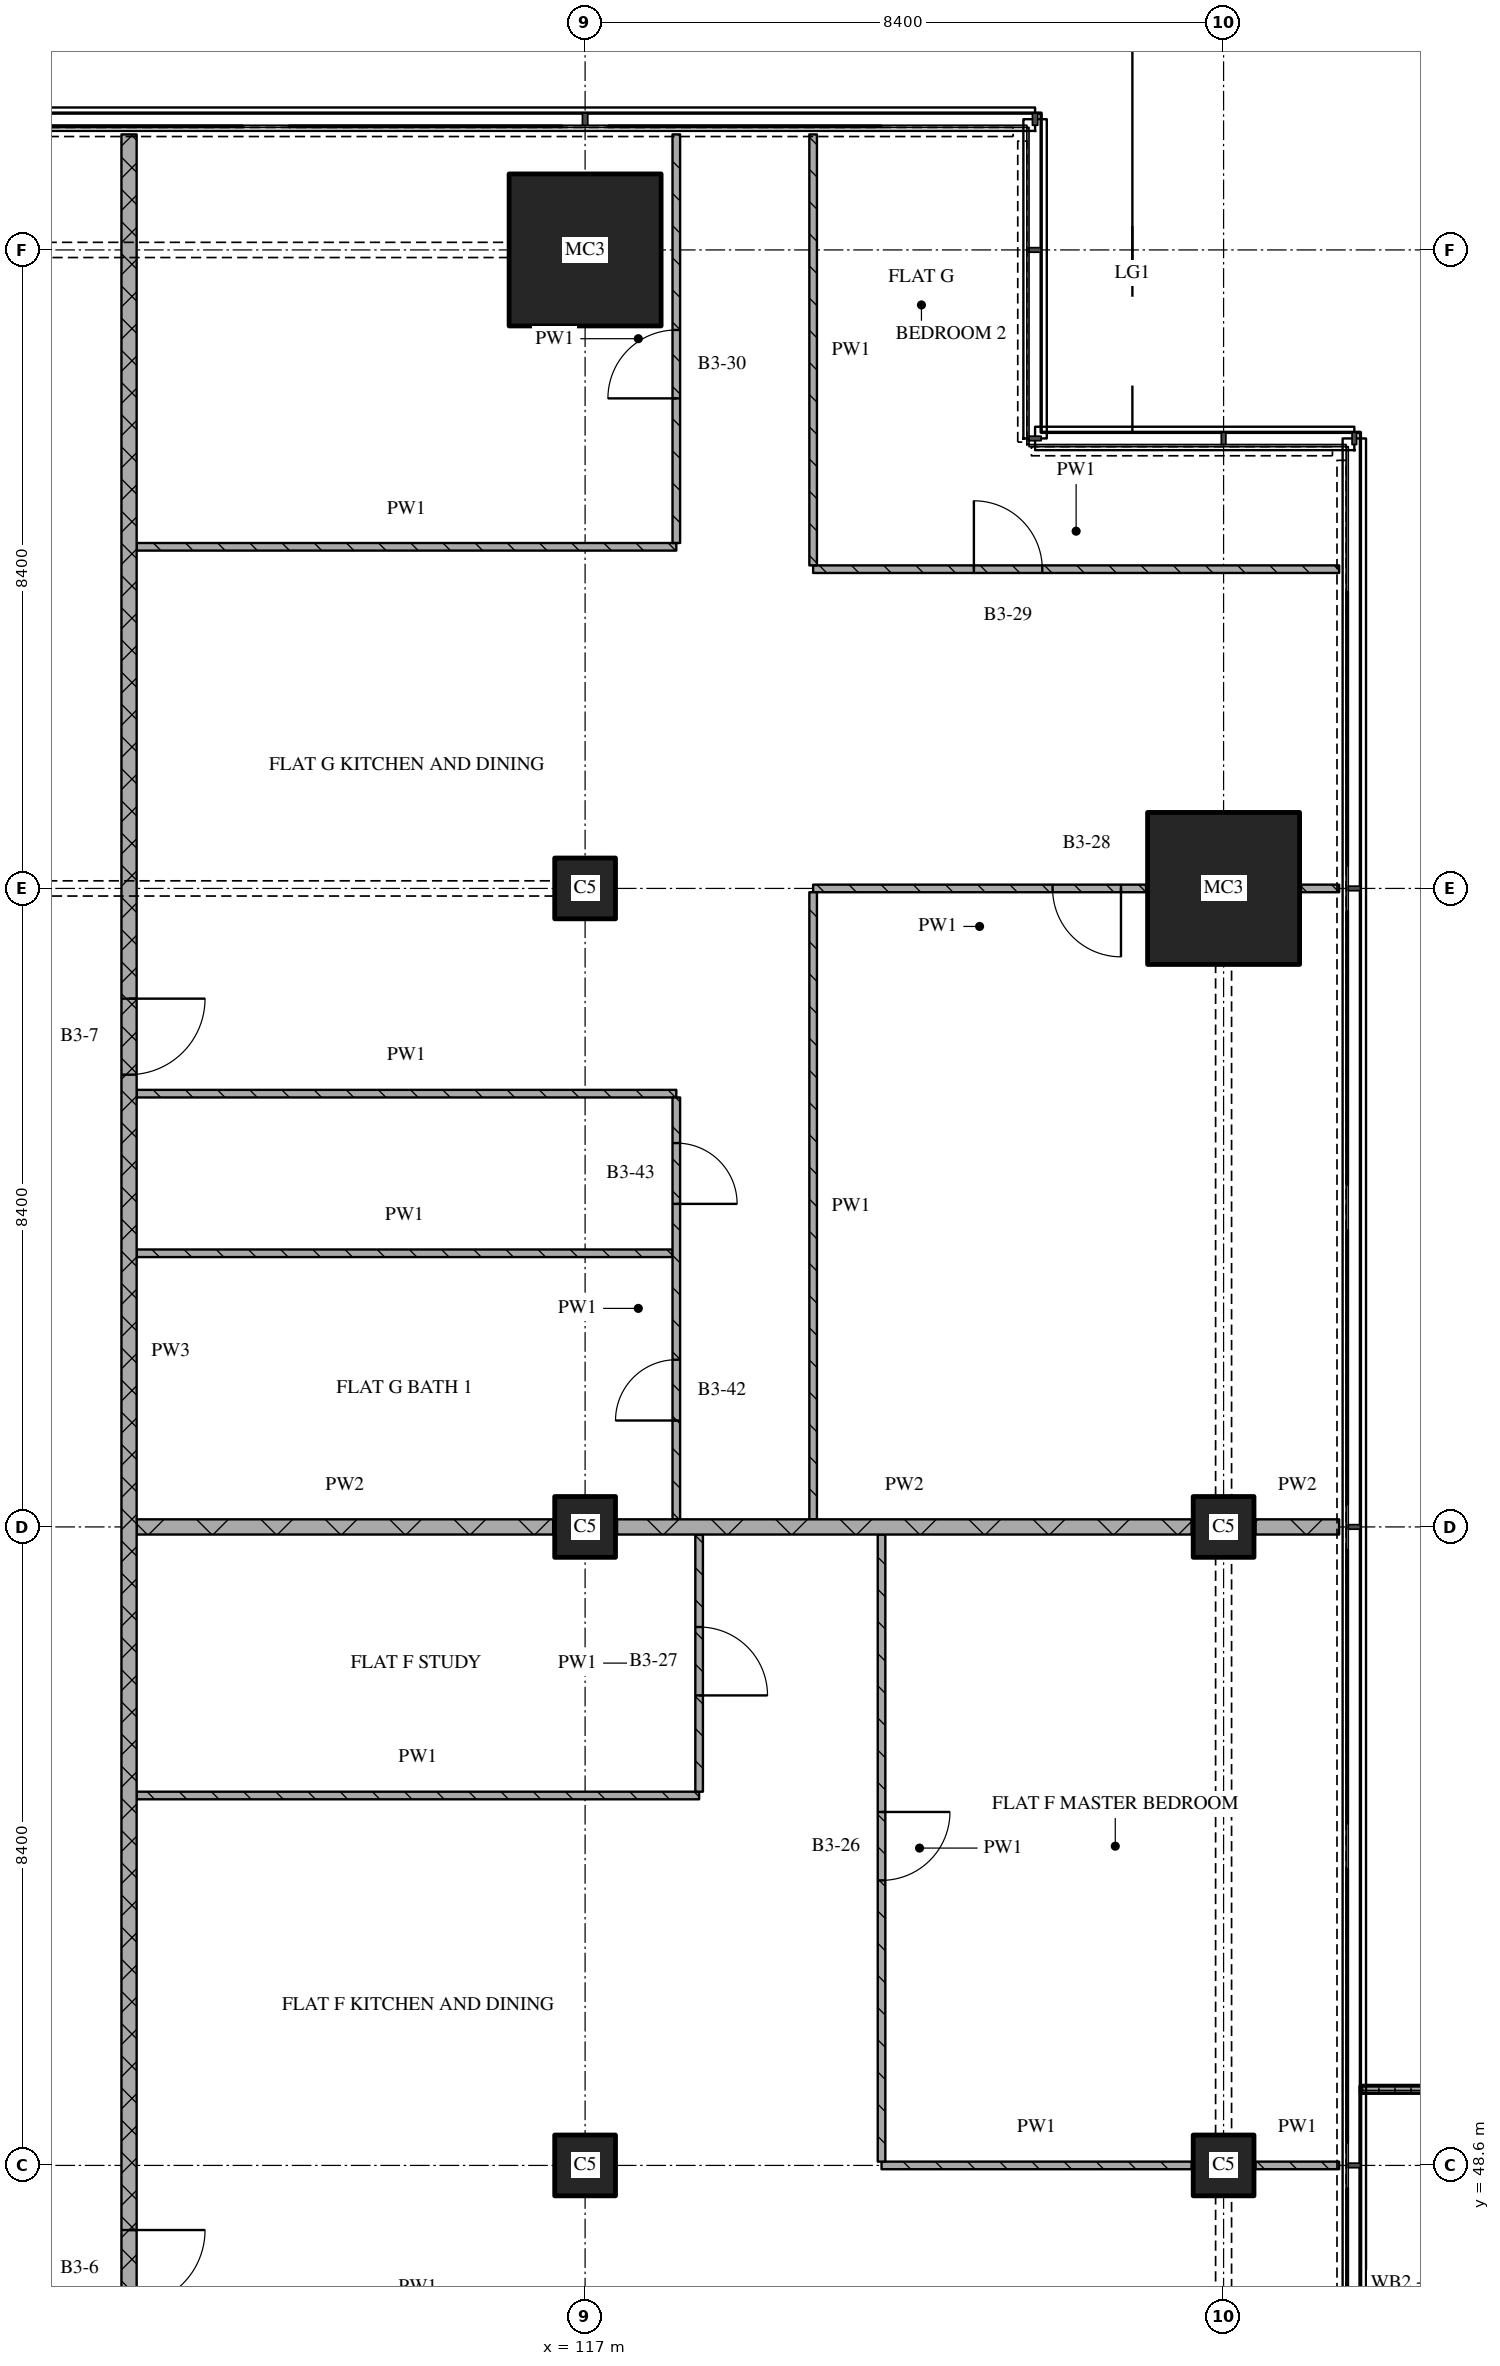
"""IFC4 building model, lengths in metres.
Left out: names, types, materials, properties, quantities, classifications, styles, units other than length and angle.
Written with IfcOpenShell. Run it as: python <this file> out.ifc"""

import sys

from ifc_helpers import new_model, si_unit, direction, frame, frame_2d, origin, origin_2d, place, context, subcontext, project, spatial, polyline, rectangle, outline, extrude, element, fill, save


model = new_model("IFC4")
c1 = context("Model", 3, precision=1e-05, world=origin(), true_north=direction((0.0, 1.0)))
c2 = subcontext(c1, "Body", "Model", "MODEL_VIEW")
j1 = project(units=[si_unit("LENGTHUNIT", "METRE"), si_unit("PLANEANGLEUNIT", "RADIAN")], contexts=[c1])
p1 = place(None, origin())
s1 = spatial("IfcSite", under=j1, at=p1, CompositionType="ELEMENT")
p2 = place(p1, origin())
s2 = spatial("IfcBuilding", under=s1, at=p2, CompositionType="ELEMENT")
p3 = place(p2, frame((0.0, 0.0, 116.85)))
s3 = spatial("IfcBuildingStorey", under=s2, at=p3, CompositionType="ELEMENT", Elevation=116.85)
for number, where, z_axis, x_axis in (
    (1, (117.0, 48.6, 0.0), (0.0, 0.0, 1.0), (1.0, 0.0, 0.0)),
    (2, (117.0, 57.0, 0.0), (0.0, 0.0, 1.0), (1.0, 0.0, 0.0)),
    (3, (117.0, 65.4, 0.0), (0.0, 0.0, 1.0), (1.0, 0.0, 0.0)),
):
    element("IfcColumn", number, at=place(p3, frame(where, z_axis=z_axis, x_axis=x_axis)), inside=s3, PredefinedType="COLUMN", context=c2, shape_type="SweptSolid", body=[
        extrude(rectangle(XDim=0.8, YDim=0.8, at=origin_2d()), origin(), (0.0, 0.0, 1.0), 3.6),
    ])
p4 = place(p3, frame((117.0, 73.8, 0.0), z_axis=(0.0, 0.0, 1.0), x_axis=(1.0, 0.0, 0.0)))
e4 = element("IfcColumn", 4, at=p4, inside=s3, PredefinedType="COLUMN", context=c2, shape_type="SweptSolid", body=[
    extrude(rectangle(XDim=2.0, YDim=2.0, at=origin_2d()), origin(), (0.0, 0.0, 1.0), 3.6),
])
for number, where, z_axis, x_axis in (
    (5, (125.4, 48.6, 0.0), (0.0, 0.0, 1.0), (1.0, 0.0, 0.0)),
    (6, (125.4, 57.0, 0.0), (0.0, 0.0, 1.0), (1.0, 0.0, 0.0)),
):
    element("IfcColumn", number, at=place(p3, frame(where, z_axis=z_axis, x_axis=x_axis)), inside=s3, PredefinedType="COLUMN", context=c2, shape_type="SweptSolid", body=[
        extrude(rectangle(XDim=0.8, YDim=0.8, at=origin_2d()), origin(), (0.0, 0.0, 1.0), 3.6),
    ])
p5 = place(p3, frame((125.4, 65.4, 0.0), z_axis=(0.0, 0.0, 1.0), x_axis=(1.0, 0.0, 0.0)))
e7 = element("IfcColumn", 7, at=p5, inside=s3, PredefinedType="COLUMN", context=c2, shape_type="SweptSolid", body=[
    extrude(rectangle(XDim=2.0, YDim=2.0, at=origin_2d()), origin(), (0.0, 0.0, 1.0), 3.6),
])
p6 = place(p3, origin())
e8 = element("IfcWall", 8, at=p6, inside=s3, PredefinedType="SOLIDWALL", context=c2, shape_type="SweptSolid", body=[
    extrude(outline(polyline([(127.2, 43.35), (127.2, 43.45), (128.967, 43.45), (128.967, 49.55), (127.2, 49.55), (127.2, 49.65), (129.067, 49.65), (129.067, 43.35), (127.2, 43.35)])), origin(), (0.0, 0.0, 1.0), 1.0),
])
p7 = place(p3, frame((120.9, 48.6, 0.0), z_axis=(0.0, 0.0, 1.0), x_axis=(1.0, 0.0, 0.0)))
e9 = element("IfcWall", 9, at=p7, inside=s3, PredefinedType="PARTITIONING", context=c2, shape_type="SweptSolid", body=[
    extrude(rectangle(XDim=4.08, YDim=0.1, at=frame_2d((2.04, 0.0))), origin(), (0.0, 0.0, 1.0), 3.32),
])
p8 = place(p3, frame((125.82, 48.6, 0.0), z_axis=(0.0, 0.0, 1.0), x_axis=(1.0, 0.0, 0.0)))
e10 = element("IfcWall", 10, at=p8, inside=s3, PredefinedType="PARTITIONING", context=c2, shape_type="SweptSolid", body=[
    extrude(rectangle(XDim=1.1, YDim=0.1, at=frame_2d((0.55, 0.0))), origin(), (0.0, 0.0, 1.0), 3.32),
])
p9 = place(p3, frame((111.1, 53.467, 0.0), z_axis=(0.0, 0.0, 1.0), x_axis=(1.0, 0.0, 0.0)))
e11 = element("IfcWall", 11, at=p9, inside=s3, PredefinedType="PARTITIONING", context=c2, shape_type="SweptSolid", body=[
    extrude(rectangle(XDim=7.4, YDim=0.1, at=frame_2d((3.7, 0.0))), origin(), (0.0, 0.0, 1.0), 3.32),
])
p10 = place(p3, frame((111.1, 57.0, 0.0), z_axis=(0.0, 0.0, 1.0), x_axis=(1.0, 0.0, 0.0)))
e12 = element("IfcWall", 12, at=p10, inside=s3, PredefinedType="PARTITIONING", context=c2, shape_type="SweptSolid", body=[
    extrude(rectangle(XDim=5.48, YDim=0.2, at=frame_2d((2.74, 0.0))), origin(), (0.0, 0.0, 1.0), 3.32),
])
p11 = place(p3, frame((117.42, 57.0, 0.0), z_axis=(0.0, 0.0, 1.0), x_axis=(1.0, 0.0, 0.0)))
e13 = element("IfcWall", 13, at=p11, inside=s3, PredefinedType="PARTITIONING", context=c2, shape_type="SweptSolid", body=[
    extrude(rectangle(XDim=7.56, YDim=0.2, at=frame_2d((3.78, 0.0))), origin(), (0.0, 0.0, 1.0), 3.32),
])
p12 = place(p3, frame((125.82, 57.0, 0.0), z_axis=(0.0, 0.0, 1.0), x_axis=(1.0, 0.0, 0.0)))
e14 = element("IfcWall", 14, at=p12, inside=s3, PredefinedType="PARTITIONING", context=c2, shape_type="SweptSolid", body=[
    extrude(rectangle(XDim=1.1, YDim=0.2, at=frame_2d((0.55, 0.0))), origin(), (0.0, 0.0, 1.0), 3.32),
])
p13 = place(p3, frame((111.1, 60.6, 0.0), z_axis=(0.0, 0.0, 1.0), x_axis=(1.0, 0.0, 0.0)))
e15 = element("IfcWall", 15, at=p13, inside=s3, PredefinedType="PARTITIONING", context=c2, shape_type="SweptSolid", body=[
    extrude(rectangle(XDim=7.05, YDim=0.1, at=frame_2d((3.525, 0.0))), origin(), (0.0, 0.0, 1.0), 3.32),
])
p14 = place(p3, frame((111.1, 62.7, 0.0), z_axis=(0.0, 0.0, 1.0), x_axis=(1.0, 0.0, 0.0)))
e16 = element("IfcWall", 16, at=p14, inside=s3, PredefinedType="PARTITIONING", context=c2, shape_type="SweptSolid", body=[
    extrude(rectangle(XDim=7.1, YDim=0.1, at=frame_2d((3.55, 0.0))), origin(), (0.0, 0.0, 1.0), 3.32),
])
p15 = place(p3, frame((124.38, 65.4, 0.0), z_axis=(0.0, 0.0, 1.0), x_axis=(-1.0, 0.0, 0.0)))
e17 = element("IfcWall", 17, at=p15, inside=s3, PredefinedType="PARTITIONING", context=c2, shape_type="SweptSolid", body=[
    extrude(rectangle(XDim=4.38, YDim=0.1, at=frame_2d((2.19, 0.0))), origin(), (0.0, 0.0, 1.0), 3.32),
])
p16 = place(p15, frame((0.33, 0.0, 0.0)))
e18 = element("IfcOpeningElement", 18, at=p16, cuts=e17, PredefinedType="OPENING", context=c2, shape_type="SweptSolid", body=[
    extrude(rectangle(XDim=0.9, YDim=2.1, at=frame_2d((0.45, 1.05))), frame((0.0, 0.06, 0.0), z_axis=(0.0, -1.0, 0.0), x_axis=(1.0, 0.0, 0.0)), (0.0, 0.0, 1.0), 0.12),
])
p17 = place(p3, frame((126.42, 65.4, 0.0), z_axis=(0.0, 0.0, 1.0), x_axis=(1.0, 0.0, 0.0)))
e19 = element("IfcWall", 19, at=p17, inside=s3, PredefinedType="PARTITIONING", context=c2, shape_type="SweptSolid", body=[
    extrude(rectangle(XDim=0.5, YDim=0.1, at=frame_2d((0.25, 0.0))), origin(), (0.0, 0.0, 1.0), 3.32),
])
p18 = place(p3, frame((120.0, 69.6, 0.0), z_axis=(0.0, 0.0, 1.0), x_axis=(1.0, 0.0, 0.0)))
e20 = element("IfcWall", 20, at=p18, inside=s3, PredefinedType="PARTITIONING", context=c2, shape_type="SweptSolid", body=[
    extrude(rectangle(XDim=6.92, YDim=0.1, at=frame_2d((3.46, 0.0))), origin(), (0.0, 0.0, 1.0), 3.32),
])
p19 = place(p18, frame((2.115, 0.0, 0.0)))
e21 = element("IfcOpeningElement", 21, at=p19, cuts=e20, PredefinedType="OPENING", context=c2, shape_type="SweptSolid", body=[
    extrude(rectangle(XDim=0.9, YDim=2.1, at=frame_2d((0.45, 1.05))), frame((0.0, 0.06, 0.0), z_axis=(0.0, -1.0, 0.0), x_axis=(1.0, 0.0, 0.0)), (0.0, 0.0, 1.0), 0.12),
])
p20 = place(p3, frame((111.1, 69.894, 0.0), z_axis=(0.0, 0.0, 1.0), x_axis=(1.0, 0.0, 0.0)))
e22 = element("IfcWall", 22, at=p20, inside=s3, PredefinedType="PARTITIONING", context=c2, shape_type="SweptSolid", body=[
    extrude(rectangle(XDim=7.1, YDim=0.1, at=frame_2d((3.55, 0.0))), origin(), (0.0, 0.0, 1.0), 3.32),
])
p21 = place(p3, frame((111.0, 75.32, 0.0), z_axis=(0.0, 0.0, 1.0), x_axis=(0.0, -1.0, 0.0)))
e23 = element("IfcWall", 23, at=p21, inside=s3, PredefinedType="PARTITIONING", context=c2, shape_type="SweptSolid", body=[
    extrude(rectangle(XDim=32.02, YDim=0.2, at=frame_2d((16.01, 0.0))), origin(), (0.0, 0.0, 1.0), 3.32),
])
p22 = place(p21, frame((11.37, 0.0, 0.0)))
e24 = element("IfcOpeningElement", 24, at=p22, cuts=e23, PredefinedType="OPENING", context=c2, shape_type="SweptSolid", body=[
    extrude(rectangle(XDim=1.0, YDim=2.1, at=frame_2d((0.5, 1.05))), frame((0.0, 0.11, 0.0), z_axis=(0.0, -1.0, 0.0), x_axis=(1.0, 0.0, 0.0)), (0.0, 0.0, 1.0), 0.22),
])
p23 = place(p21, frame((27.57, 0.0, 0.0)))
e25 = element("IfcOpeningElement", 25, at=p23, cuts=e23, PredefinedType="OPENING", context=c2, shape_type="SweptSolid", body=[
    extrude(rectangle(XDim=1.0, YDim=2.1, at=frame_2d((0.5, 1.05))), frame((0.0, 0.11, 0.0), z_axis=(0.0, -1.0, 0.0), x_axis=(1.0, 0.0, 0.0)), (0.0, 0.0, 1.0), 0.22),
])
p24 = place(p3, frame((118.2, 57.1, 0.0), z_axis=(0.0, 0.0, 1.0), x_axis=(0.0, 1.0, 0.0)))
e26 = element("IfcWall", 26, at=p24, inside=s3, PredefinedType="PARTITIONING", context=c2, shape_type="SweptSolid", body=[
    extrude(rectangle(XDim=5.55, YDim=0.1, at=frame_2d((2.775, 0.0))), origin(), (0.0, 0.0, 1.0), 3.32),
])
p25 = place(p24, frame((1.3, 0.0, 0.0)))
e27 = element("IfcOpeningElement", 27, at=p25, cuts=e26, PredefinedType="OPENING", context=c2, shape_type="SweptSolid", body=[
    extrude(rectangle(XDim=0.8, YDim=2.1, at=frame_2d((0.4, 1.05))), frame((0.0, 0.06, 0.0), z_axis=(0.0, -1.0, 0.0), x_axis=(1.0, 0.0, 0.0)), (0.0, 0.0, 1.0), 0.12),
])
p26 = place(p24, frame((4.15, 0.0, 0.0)))
e28 = element("IfcOpeningElement", 28, at=p26, cuts=e26, PredefinedType="OPENING", context=c2, shape_type="SweptSolid", body=[
    extrude(rectangle(XDim=0.8, YDim=2.1, at=frame_2d((0.4, 1.05))), frame((0.0, 0.06, 0.0), z_axis=(0.0, -1.0, 0.0), x_axis=(1.0, 0.0, 0.0)), (0.0, 0.0, 1.0), 0.12),
])
p27 = place(p3, frame((118.2, 69.944, 0.0), z_axis=(0.0, 0.0, 1.0), x_axis=(0.0, 1.0, 0.0)))
e29 = element("IfcWall", 29, at=p27, inside=s3, PredefinedType="PARTITIONING", context=c2, shape_type="SweptSolid", body=[
    extrude(rectangle(XDim=5.376, YDim=0.1, at=frame_2d((2.688, 0.0))), origin(), (0.0, 0.0, 1.0), 3.32),
])
p28 = place(p27, frame((1.903, 0.0, 0.0)))
e30 = element("IfcOpeningElement", 30, at=p28, cuts=e29, PredefinedType="OPENING", context=c2, shape_type="SweptSolid", body=[
    extrude(rectangle(XDim=0.9, YDim=2.1, at=frame_2d((0.45, 1.05))), frame((0.0, 0.06, 0.0), z_axis=(0.0, -1.0, 0.0), x_axis=(1.0, 0.0, 0.0)), (0.0, 0.0, 1.0), 0.12),
])
p29 = place(p3, frame((118.5, 53.517, 0.0), z_axis=(0.0, 0.0, 1.0), x_axis=(0.0, 1.0, 0.0)))
e31 = element("IfcWall", 31, at=p29, inside=s3, PredefinedType="PARTITIONING", context=c2, shape_type="SweptSolid", body=[
    extrude(rectangle(XDim=3.383, YDim=0.1, at=frame_2d((1.692, 0.0))), origin(), (0.0, 0.0, 1.0), 3.32),
])
p30 = place(p29, frame((1.267, 0.0, 0.0)))
e32 = element("IfcOpeningElement", 32, at=p30, cuts=e31, PredefinedType="OPENING", context=c2, shape_type="SweptSolid", body=[
    extrude(rectangle(XDim=0.9, YDim=2.1, at=frame_2d((0.45, 1.05))), frame((0.0, 0.06, 0.0), z_axis=(0.0, -1.0, 0.0), x_axis=(1.0, 0.0, 0.0)), (0.0, 0.0, 1.0), 0.12),
])
p31 = place(p3, frame((120.0, 65.35, 0.0), z_axis=(0.0, 0.0, 1.0), x_axis=(0.0, -1.0, 0.0)))
e33 = element("IfcWall", 33, at=p31, inside=s3, PredefinedType="PARTITIONING", context=c2, shape_type="SweptSolid", body=[
    extrude(rectangle(XDim=8.25, YDim=0.1, at=frame_2d((4.125, 0.0))), origin(), (0.0, 0.0, 1.0), 3.32),
])
p32 = place(p3, frame((120.0, 75.32, 0.0), z_axis=(0.0, 0.0, 1.0), x_axis=(0.0, -1.0, 0.0)))
e34 = element("IfcWall", 34, at=p32, inside=s3, PredefinedType="PARTITIONING", context=c2, shape_type="SweptSolid", body=[
    extrude(rectangle(XDim=5.67, YDim=0.1, at=frame_2d((2.835, 0.0))), origin(), (0.0, 0.0, 1.0), 3.32),
])
p33 = place(p3, frame((120.9, 56.9, 0.0), z_axis=(0.0, 0.0, 1.0), x_axis=(0.0, -1.0, 0.0)))
e35 = element("IfcWall", 35, at=p33, inside=s3, PredefinedType="PARTITIONING", context=c2, shape_type="SweptSolid", body=[
    extrude(rectangle(XDim=8.25, YDim=0.1, at=frame_2d((4.125, 0.0))), origin(), (0.0, 0.0, 1.0), 3.32),
])
p34 = place(p33, frame((3.65, 0.0, 0.0)))
e36 = element("IfcOpeningElement", 36, at=p34, cuts=e35, PredefinedType="OPENING", context=c2, shape_type="SweptSolid", body=[
    extrude(rectangle(XDim=0.9, YDim=2.1, at=frame_2d((0.45, 1.05))), frame((0.0, 0.06, 0.0), z_axis=(0.0, -1.0, 0.0), x_axis=(1.0, 0.0, 0.0)), (0.0, 0.0, 1.0), 0.12),
])
p35 = place(p16, origin())
e37 = element("IfcDoor", 37, at=p35, inside=s3, OperationType="SINGLE_SWING_LEFT", PredefinedType="DOOR", context=c2, shape_type="SweptSolid", body=[
    extrude(rectangle(XDim=0.9, YDim=2.1, at=frame_2d((0.45, 1.05))), frame((0.0, 0.025, 0.0), z_axis=(0.0, -1.0, 0.0), x_axis=(1.0, 0.0, 0.0)), (0.0, 0.0, 1.0), 0.05),
])
fill(e18, e37)
p36 = place(p19, origin())
e38 = element("IfcDoor", 38, at=p36, inside=s3, OperationType="SINGLE_SWING_LEFT", PredefinedType="DOOR", context=c2, shape_type="SweptSolid", body=[
    extrude(rectangle(XDim=0.9, YDim=2.1, at=frame_2d((0.45, 1.05))), frame((0.0, 0.025, 0.0), z_axis=(0.0, -1.0, 0.0), x_axis=(1.0, 0.0, 0.0)), (0.0, 0.0, 1.0), 0.05),
])
fill(e21, e38)
p37 = place(p22, origin())
e39 = element("IfcDoor", 39, at=p37, inside=s3, OperationType="SINGLE_SWING_LEFT", PredefinedType="DOOR", context=c2, shape_type="SweptSolid", body=[
    extrude(rectangle(XDim=1.0, YDim=2.1, at=frame_2d((0.5, 1.05))), frame((0.0, 0.025, 0.0), z_axis=(0.0, -1.0, 0.0), x_axis=(1.0, 0.0, 0.0)), (0.0, 0.0, 1.0), 0.05),
])
fill(e24, e39)
p38 = place(p23, origin())
e40 = element("IfcDoor", 40, at=p38, inside=s3, OperationType="SINGLE_SWING_LEFT", PredefinedType="DOOR", context=c2, shape_type="SweptSolid", body=[
    extrude(rectangle(XDim=1.0, YDim=2.1, at=frame_2d((0.5, 1.05))), frame((0.0, 0.025, 0.0), z_axis=(0.0, -1.0, 0.0), x_axis=(1.0, 0.0, 0.0)), (0.0, 0.0, 1.0), 0.05),
])
fill(e25, e40)
p39 = place(p25, origin())
e41 = element("IfcDoor", 41, at=p39, inside=s3, OperationType="SINGLE_SWING_LEFT", PredefinedType="DOOR", context=c2, shape_type="SweptSolid", body=[
    extrude(rectangle(XDim=0.8, YDim=2.1, at=frame_2d((0.4, 1.05))), frame((0.0, 0.025, 0.0), z_axis=(0.0, -1.0, 0.0), x_axis=(1.0, 0.0, 0.0)), (0.0, 0.0, 1.0), 0.05),
])
fill(e27, e41)
p40 = place(p26, origin())
e42 = element("IfcDoor", 42, at=p40, inside=s3, OperationType="SINGLE_SWING_RIGHT", PredefinedType="DOOR", context=c2, shape_type="SweptSolid", body=[
    extrude(rectangle(XDim=0.8, YDim=2.1, at=frame_2d((0.4, 1.05))), frame((0.0, 0.025, 0.0), z_axis=(0.0, -1.0, 0.0), x_axis=(1.0, 0.0, 0.0)), (0.0, 0.0, 1.0), 0.05),
])
fill(e28, e42)
p41 = place(p28, origin())
e43 = element("IfcDoor", 43, at=p41, inside=s3, OperationType="SINGLE_SWING_LEFT", PredefinedType="DOOR", context=c2, shape_type="SweptSolid", body=[
    extrude(rectangle(XDim=0.9, YDim=2.1, at=frame_2d((0.45, 1.05))), frame((0.0, 0.025, 0.0), z_axis=(0.0, -1.0, 0.0), x_axis=(1.0, 0.0, 0.0)), (0.0, 0.0, 1.0), 0.05),
])
fill(e30, e43)
p42 = place(p30, origin())
e44 = element("IfcDoor", 44, at=p42, inside=s3, OperationType="SINGLE_SWING_RIGHT", PredefinedType="DOOR", context=c2, shape_type="SweptSolid", body=[
    extrude(rectangle(XDim=0.9, YDim=2.1, at=frame_2d((0.45, 1.05))), frame((0.0, 0.025, 0.0), z_axis=(0.0, -1.0, 0.0), x_axis=(1.0, 0.0, 0.0)), (0.0, 0.0, 1.0), 0.05),
])
fill(e32, e44)
p43 = place(p34, origin())
e45 = element("IfcDoor", 45, at=p43, inside=s3, OperationType="SINGLE_SWING_LEFT", PredefinedType="DOOR", context=c2, shape_type="SweptSolid", body=[
    extrude(rectangle(XDim=0.9, YDim=2.1, at=frame_2d((0.45, 1.05))), frame((0.0, 0.025, 0.0), z_axis=(0.0, -1.0, 0.0), x_axis=(1.0, 0.0, 0.0)), (0.0, 0.0, 1.0), 0.05),
])
fill(e36, e45)
save(model, sys.argv[1])
